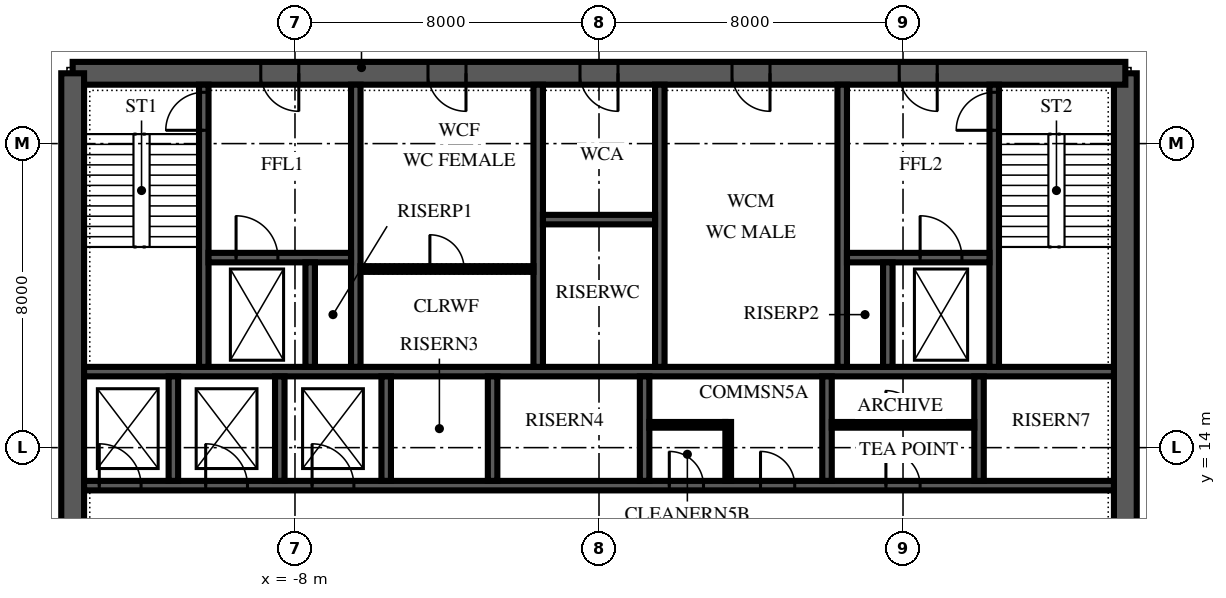
"""IFC4 building model, lengths in metres.
Left out: names, types, materials, properties, quantities, classifications, styles, units other than length and angle.
Written with IfcOpenShell. Run it as: python <this file> out.ifc"""

import sys

from ifc_helpers import new_model, si_unit, direction, frame, frame_2d, origin, place, context, subcontext, project, spatial, polyline, rectangle, outline, extrude, element, fill, save


model = new_model("IFC4")
c1 = context("Model", 3, precision=1e-05, world=origin(), true_north=direction((0.0, 1.0)))
c2 = subcontext(c1, "Body", "Model", "MODEL_VIEW")
j1 = project(units=[si_unit("LENGTHUNIT", "METRE"), si_unit("PLANEANGLEUNIT", "RADIAN")], contexts=[c1])
p1 = place(None, origin())
s1 = spatial("IfcSite", under=j1, at=p1, CompositionType="ELEMENT")
p2 = place(p1, origin())
s2 = spatial("IfcBuilding", under=s1, at=p2, CompositionType="ELEMENT")
p3 = place(p2, frame((0.0, 0.0, 190.0)))
s3 = spatial("IfcBuildingStorey", under=s2, at=p3, CompositionType="ELEMENT", Elevation=190.0)
p4 = place(p3, frame((13.85, 6.15, 0.0), z_axis=(0.0, 0.0, 1.0), x_axis=(0.0, 1.0, 0.0)))
e1 = element("IfcWall", 1, at=p4, inside=s3, PredefinedType="SHEAR", context=c2, shape_type="SweptSolid", body=[
    extrude(outline(polyline([(0.0, -0.3), (17.7, -0.3), (17.7, 0.0), (17.4, 0.0), (17.4, 0.3), (0.3, 0.3), (0.3, 0.0), (0.0, 0.0), (0.0, -0.3)])), origin(), (0.0, 0.0, 1.0), 4.0),
])
p5 = place(p4, frame((4.15, 0.0, 0.0)))
e2 = element("IfcOpeningElement", 2, at=p5, cuts=e1, PredefinedType="OPENING", context=c2, shape_type="SweptSolid", body=[
    extrude(rectangle(XDim=1.8, YDim=2.4, at=frame_2d((0.9, 1.2))), frame((0.0, 0.315, 0.0), z_axis=(0.0, -1.0, 0.0), x_axis=(1.0, 0.0, 0.0)), (0.0, 0.0, 1.0), 0.63),
])
p6 = place(p3, frame((13.85, 23.85, 0.0), z_axis=(0.0, 0.0, 1.0), x_axis=(-1.0, 0.0, 0.0)))
e3 = element("IfcWall", 3, at=p6, inside=s3, PredefinedType="SHEAR", context=c2, shape_type="SweptSolid", body=[
    extrude(rectangle(XDim=27.7, YDim=0.6, at=frame_2d((13.85, 0.0))), origin(), (0.0, 0.0, 1.0), 4.0),
])
p7 = place(p6, frame((21.75, 0.0, 0.0)))
e4 = element("IfcOpeningElement", 4, at=p7, cuts=e3, PredefinedType="OPENING", context=c2, shape_type="SweptSolid", body=[
    extrude(rectangle(XDim=1.0, YDim=2.1, at=frame_2d((0.5, 1.05))), frame((0.0, 0.315, 0.0), z_axis=(0.0, -1.0, 0.0), x_axis=(1.0, 0.0, 0.0)), (0.0, 0.0, 1.0), 0.63),
])
p8 = place(p6, frame((4.95, 0.0, 0.0)))
e5 = element("IfcOpeningElement", 5, at=p8, cuts=e3, PredefinedType="OPENING", context=c2, shape_type="SweptSolid", body=[
    extrude(rectangle(XDim=1.0, YDim=2.1, at=frame_2d((0.5, 1.05))), frame((0.0, 0.315, 0.0), z_axis=(0.0, -1.0, 0.0), x_axis=(1.0, 0.0, 0.0)), (0.0, 0.0, 1.0), 0.63),
])
p9 = place(p6, frame((17.35, 0.0, 0.0)))
e6 = element("IfcOpeningElement", 6, at=p9, cuts=e3, PredefinedType="OPENING", context=c2, shape_type="SweptSolid", body=[
    extrude(rectangle(XDim=1.0, YDim=2.1, at=frame_2d((0.5, 1.05))), frame((0.0, 0.315, 0.0), z_axis=(0.0, -1.0, 0.0), x_axis=(1.0, 0.0, 0.0)), (0.0, 0.0, 1.0), 0.63),
])
p10 = place(p6, frame((13.35, 0.0, 0.0)))
e7 = element("IfcOpeningElement", 7, at=p10, cuts=e3, PredefinedType="OPENING", context=c2, shape_type="SweptSolid", body=[
    extrude(rectangle(XDim=1.0, YDim=2.1, at=frame_2d((0.5, 1.05))), frame((0.0, 0.315, 0.0), z_axis=(0.0, -1.0, 0.0), x_axis=(1.0, 0.0, 0.0)), (0.0, 0.0, 1.0), 0.63),
])
p11 = place(p6, frame((9.35, 0.0, 0.0)))
e8 = element("IfcOpeningElement", 8, at=p11, cuts=e3, PredefinedType="OPENING", context=c2, shape_type="SweptSolid", body=[
    extrude(rectangle(XDim=1.0, YDim=2.1, at=frame_2d((0.5, 1.05))), frame((0.0, 0.315, 0.0), z_axis=(0.0, -1.0, 0.0), x_axis=(1.0, 0.0, 0.0)), (0.0, 0.0, 1.0), 0.63),
])
p12 = place(p3, frame((-13.85, 23.85, 0.0), z_axis=(0.0, 0.0, 1.0), x_axis=(0.0, -1.0, 0.0)))
e9 = element("IfcWall", 9, at=p12, inside=s3, PredefinedType="SHEAR", context=c2, shape_type="SweptSolid", body=[
    extrude(outline(polyline([(0.0, -0.3), (17.7, -0.3), (17.7, 0.0), (17.4, 0.0), (17.4, 0.3), (0.3, 0.3), (0.3, 0.0), (0.0, 0.0), (0.0, -0.3)])), origin(), (0.0, 0.0, 1.0), 4.0),
])
p13 = place(p12, frame((11.75, 0.0, 0.0)))
e10 = element("IfcOpeningElement", 10, at=p13, cuts=e9, PredefinedType="OPENING", context=c2, shape_type="SweptSolid", body=[
    extrude(rectangle(XDim=1.8, YDim=2.4, at=frame_2d((0.9, 1.2))), frame((0.0, 0.315, 0.0), z_axis=(0.0, -1.0, 0.0), x_axis=(1.0, 0.0, 0.0)), (0.0, 0.0, 1.0), 0.63),
])
p14 = place(p3, frame((-13.55, 13.0, 0.0), z_axis=(0.0, 0.0, 1.0), x_axis=(1.0, 0.0, 0.0)))
e11 = element("IfcWall", 11, at=p14, inside=s3, PredefinedType="SHEAR", context=c2, shape_type="SweptSolid", body=[
    extrude(rectangle(XDim=27.1, YDim=0.25, at=frame_2d((13.55, 0.0))), origin(), (0.0, 0.0, 1.0), 4.0),
])
p15 = place(p14, frame((0.4, 0.0, 0.0)))
e12 = element("IfcOpeningElement", 12, at=p15, cuts=e11, PredefinedType="OPENING", context=c2, shape_type="SweptSolid", body=[
    extrude(rectangle(XDim=1.1, YDim=2.1, at=frame_2d((0.55, 1.05))), frame((0.0, 0.14, 0.0), z_axis=(0.0, -1.0, 0.0), x_axis=(1.0, 0.0, 0.0)), (0.0, 0.0, 1.0), 0.28),
])
p16 = place(p14, frame((3.2, 0.0, 0.0)))
e13 = element("IfcOpeningElement", 13, at=p16, cuts=e11, PredefinedType="OPENING", context=c2, shape_type="SweptSolid", body=[
    extrude(rectangle(XDim=1.1, YDim=2.1, at=frame_2d((0.55, 1.05))), frame((0.0, 0.14, 0.0), z_axis=(0.0, -1.0, 0.0), x_axis=(1.0, 0.0, 0.0)), (0.0, 0.0, 1.0), 0.28),
])
p17 = place(p14, frame((6.0, 0.0, 0.0)))
e14 = element("IfcOpeningElement", 14, at=p17, cuts=e11, PredefinedType="OPENING", context=c2, shape_type="SweptSolid", body=[
    extrude(rectangle(XDim=1.1, YDim=2.1, at=frame_2d((0.55, 1.05))), frame((0.0, 0.14, 0.0), z_axis=(0.0, -1.0, 0.0), x_axis=(1.0, 0.0, 0.0)), (0.0, 0.0, 1.0), 0.28),
])
p18 = place(p14, frame((17.8, 0.0, 0.0)))
e15 = element("IfcOpeningElement", 15, at=p18, cuts=e11, PredefinedType="OPENING", context=c2, shape_type="SweptSolid", body=[
    extrude(rectangle(XDim=0.9, YDim=2.1, at=frame_2d((0.45, 1.05))), frame((0.0, 0.14, 0.0), z_axis=(0.0, -1.0, 0.0), x_axis=(1.0, 0.0, 0.0)), (0.0, 0.0, 1.0), 0.28),
])
p19 = place(p14, frame((15.4, 0.0, 0.0)))
e16 = element("IfcOpeningElement", 16, at=p19, cuts=e11, PredefinedType="OPENING", context=c2, shape_type="SweptSolid", body=[
    extrude(rectangle(XDim=0.9, YDim=2.1, at=frame_2d((0.45, 1.05))), frame((0.0, 0.14, 0.0), z_axis=(0.0, -1.0, 0.0), x_axis=(1.0, 0.0, 0.0)), (0.0, 0.0, 1.0), 0.28),
])
p20 = place(p14, frame((21.1, 0.0, 0.0)))
e17 = element("IfcOpeningElement", 17, at=p20, cuts=e11, PredefinedType="OPENING", context=c2, shape_type="SweptSolid", body=[
    extrude(rectangle(XDim=0.9, YDim=2.1, at=frame_2d((0.45, 1.05))), frame((0.0, 0.14, 0.0), z_axis=(0.0, -1.0, 0.0), x_axis=(1.0, 0.0, 0.0)), (0.0, 0.0, 1.0), 0.28),
])
p21 = place(p3, frame((-13.55, 16.0, 0.0), z_axis=(0.0, 0.0, 1.0), x_axis=(1.0, 0.0, 0.0)))
e18 = element("IfcWall", 18, at=p21, inside=s3, PredefinedType="SHEAR", context=c2, shape_type="SweptSolid", body=[
    extrude(rectangle(XDim=27.1, YDim=0.25, at=frame_2d((13.55, 0.0))), origin(), (0.0, 0.0, 1.0), 4.0),
])
for number, where, z_axis, x_axis in (
    (19, (-11.2, 13.125, 0.0), (0.0, 0.0, 1.0), (0.0, 1.0, 0.0)),
    (20, (-8.4, 13.125, 0.0), (0.0, 0.0, 1.0), (0.0, 1.0, 0.0)),
    (21, (-5.6, 13.125, 0.0), (0.0, 0.0, 1.0), (0.0, 1.0, 0.0)),
    (22, (-2.8, 13.125, 0.0), (0.0, 0.0, 1.0), (0.0, 1.0, 0.0)),
    (23, (1.2, 13.125, 0.0), (0.0, 0.0, 1.0), (0.0, 1.0, 0.0)),
    (24, (6.0, 13.125, 0.0), (0.0, 0.0, 1.0), (0.0, 1.0, 0.0)),
    (25, (10.0, 13.125, 0.0), (0.0, 0.0, 1.0), (0.0, 1.0, 0.0)),
):
    element("IfcWall", number, at=place(p3, frame(where, z_axis=z_axis, x_axis=x_axis)), inside=s3, PredefinedType="SHEAR", context=c2, shape_type="SweptSolid", body=[
        extrude(rectangle(XDim=2.75, YDim=0.25, at=frame_2d((1.375, 0.0))), origin(), (0.0, 0.0, 1.0), 4.0),
    ])
p22 = place(p3, frame((-10.4, 16.125, 0.0), z_axis=(0.0, 0.0, 1.0), x_axis=(0.0, 1.0, 0.0)))
e26 = element("IfcWall", 26, at=p22, inside=s3, PredefinedType="SHEAR", context=c2, shape_type="SweptSolid", body=[
    extrude(rectangle(XDim=7.425, YDim=0.25, at=frame_2d((3.712, 0.0))), origin(), (0.0, 0.0, 1.0), 4.0),
])
p23 = place(p22, frame((6.225, 0.0, 0.0)))
e27 = element("IfcOpeningElement", 27, at=p23, cuts=e26, PredefinedType="OPENING", context=c2, shape_type="SweptSolid", body=[
    extrude(rectangle(XDim=1.0, YDim=2.1, at=frame_2d((0.5, 1.05))), frame((0.0, 0.14, 0.0), z_axis=(0.0, -1.0, 0.0), x_axis=(1.0, 0.0, 0.0)), (0.0, 0.0, 1.0), 0.28),
])
for number, where, z_axis, x_axis in (
    (28, (-6.4, 16.125, 0.0), (0.0, 0.0, 1.0), (0.0, 1.0, 0.0)),
    (29, (-1.6, 16.125, 0.0), (0.0, 0.0, 1.0), (0.0, 1.0, 0.0)),
    (30, (1.6, 16.125, 0.0), (0.0, 0.0, 1.0), (0.0, 1.0, 0.0)),
    (31, (6.4, 16.125, 0.0), (0.0, 0.0, 1.0), (0.0, 1.0, 0.0)),
):
    element("IfcWall", number, at=place(p3, frame(where, z_axis=z_axis, x_axis=x_axis)), inside=s3, PredefinedType="SHEAR", context=c2, shape_type="SweptSolid", body=[
        extrude(rectangle(XDim=7.425, YDim=0.25, at=frame_2d((3.712, 0.0))), origin(), (0.0, 0.0, 1.0), 4.0),
    ])
p24 = place(p3, frame((10.4, 16.125, 0.0), z_axis=(0.0, 0.0, 1.0), x_axis=(0.0, 1.0, 0.0)))
e32 = element("IfcWall", 32, at=p24, inside=s3, PredefinedType="SHEAR", context=c2, shape_type="SweptSolid", body=[
    extrude(rectangle(XDim=7.425, YDim=0.25, at=frame_2d((3.712, 0.0))), origin(), (0.0, 0.0, 1.0), 4.0),
])
p25 = place(p24, frame((6.225, 0.0, 0.0)))
e33 = element("IfcOpeningElement", 33, at=p25, cuts=e32, PredefinedType="OPENING", context=c2, shape_type="SweptSolid", body=[
    extrude(rectangle(XDim=1.0, YDim=2.1, at=frame_2d((0.5, 1.05))), frame((0.0, 0.14, 0.0), z_axis=(0.0, -1.0, 0.0), x_axis=(1.0, 0.0, 0.0)), (0.0, 0.0, 1.0), 0.28),
])
p26 = place(p3, frame((-10.275, 19.0, 0.0), z_axis=(0.0, 0.0, 1.0), x_axis=(1.0, 0.0, 0.0)))
e34 = element("IfcWall", 34, at=p26, inside=s3, PredefinedType="SHEAR", context=c2, shape_type="SweptSolid", body=[
    extrude(rectangle(XDim=3.75, YDim=0.25, at=frame_2d((1.875, 0.0))), origin(), (0.0, 0.0, 1.0), 4.0),
])
p27 = place(p26, frame((0.725, 0.0, 0.0)))
e35 = element("IfcOpeningElement", 35, at=p27, cuts=e34, PredefinedType="OPENING", context=c2, shape_type="SweptSolid", body=[
    extrude(rectangle(XDim=1.1, YDim=2.1, at=frame_2d((0.55, 1.05))), frame((0.0, 0.14, 0.0), z_axis=(0.0, -1.0, 0.0), x_axis=(1.0, 0.0, 0.0)), (0.0, 0.0, 1.0), 0.28),
])
p28 = place(p3, frame((6.525, 19.0, 0.0), z_axis=(0.0, 0.0, 1.0), x_axis=(1.0, 0.0, 0.0)))
e36 = element("IfcWall", 36, at=p28, inside=s3, PredefinedType="SHEAR", context=c2, shape_type="SweptSolid", body=[
    extrude(rectangle(XDim=3.75, YDim=0.25, at=frame_2d((1.875, 0.0))), origin(), (0.0, 0.0, 1.0), 4.0),
])
p29 = place(p28, frame((1.925, 0.0, 0.0)))
e37 = element("IfcOpeningElement", 37, at=p29, cuts=e36, PredefinedType="OPENING", context=c2, shape_type="SweptSolid", body=[
    extrude(rectangle(XDim=1.1, YDim=2.1, at=frame_2d((0.55, 1.05))), frame((0.0, 0.14, 0.0), z_axis=(0.0, -1.0, 0.0), x_axis=(1.0, 0.0, 0.0)), (0.0, 0.0, 1.0), 0.28),
])
for number, where, z_axis, x_axis in (
    (38, (-7.6, 16.125, 0.0), (0.0, 0.0, 1.0), (0.0, 1.0, 0.0)),
    (39, (7.6, 16.125, 0.0), (0.0, 0.0, 1.0), (0.0, 1.0, 0.0)),
):
    element("IfcWall", number, at=place(p3, frame(where, z_axis=z_axis, x_axis=x_axis)), inside=s3, PredefinedType="SHEAR", context=c2, shape_type="SweptSolid", body=[
        extrude(rectangle(XDim=2.75, YDim=0.25, at=frame_2d((1.375, 0.0))), origin(), (0.0, 0.0, 1.0), 4.0),
    ])
p30 = place(p3, frame((-1.475, 20.0, 0.0), z_axis=(0.0, 0.0, 1.0), x_axis=(1.0, 0.0, 0.0)))
e40 = element("IfcWall", 40, at=p30, inside=s3, PredefinedType="SHEAR", context=c2, shape_type="SweptSolid", body=[
    extrude(rectangle(XDim=2.95, YDim=0.25, at=frame_2d((1.475, 0.0))), origin(), (0.0, 0.0, 1.0), 4.0),
])
p31 = place(p3, frame((-6.275, 18.7, 0.0), z_axis=(0.0, 0.0, 1.0), x_axis=(1.0, 0.0, 0.0)))
e41 = element("IfcWall", 41, at=p31, inside=s3, PredefinedType="PARTITIONING", context=c2, shape_type="SweptSolid", body=[
    extrude(rectangle(XDim=4.55, YDim=0.15, at=frame_2d((2.275, 0.0))), origin(), (0.0, 0.0, 1.0), 3.85),
])
p32 = place(p31, frame((1.825, 0.0, 0.0)))
e42 = element("IfcOpeningElement", 42, at=p32, cuts=e41, PredefinedType="OPENING", context=c2, shape_type="SweptSolid", body=[
    extrude(rectangle(XDim=0.9, YDim=2.1, at=frame_2d((0.45, 1.05))), frame((0.0, 0.09, 0.0), z_axis=(0.0, -1.0, 0.0), x_axis=(1.0, 0.0, 0.0)), (0.0, 0.0, 1.0), 0.18),
])
p33 = place(p3, frame((3.4, 13.125, 0.0), z_axis=(0.0, 0.0, 1.0), x_axis=(0.0, 1.0, 0.0)))
e43 = element("IfcWall", 43, at=p33, inside=s3, PredefinedType="PARTITIONING", context=c2, shape_type="SweptSolid", body=[
    extrude(rectangle(XDim=1.55, YDim=0.15, at=frame_2d((0.775, 0.0))), origin(), (0.0, 0.0, 1.0), 3.85),
])
p34 = place(p3, frame((1.325, 14.6, 0.0), z_axis=(0.0, 0.0, 1.0), x_axis=(1.0, 0.0, 0.0)))
e44 = element("IfcWall", 44, at=p34, inside=s3, PredefinedType="PARTITIONING", context=c2, shape_type="SweptSolid", body=[
    extrude(rectangle(XDim=2.0, YDim=0.15, at=frame_2d((1.0, 0.0))), origin(), (0.0, 0.0, 1.0), 3.85),
])
p35 = place(p3, frame((6.125, 14.6, 0.0), z_axis=(0.0, 0.0, 1.0), x_axis=(1.0, 0.0, 0.0)))
e45 = element("IfcWall", 45, at=p35, inside=s3, PredefinedType="PARTITIONING", context=c2, shape_type="SweptSolid", body=[
    extrude(rectangle(XDim=3.75, YDim=0.15, at=frame_2d((1.875, 0.0))), origin(), (0.0, 0.0, 1.0), 3.85),
])
p36 = place(p35, frame((1.425, 0.0, 0.0)))
e46 = element("IfcOpeningElement", 46, at=p36, cuts=e45, PredefinedType="OPENING", context=c2, shape_type="SweptSolid", body=[
    extrude(rectangle(XDim=0.9, YDim=2.1, at=frame_2d((0.45, 1.05))), frame((0.0, 0.09, 0.0), z_axis=(0.0, -1.0, 0.0), x_axis=(1.0, 0.0, 0.0)), (0.0, 0.0, 1.0), 0.18),
])
p37 = place(p7, origin())
e47 = element("IfcDoor", 47, at=p37, inside=s3, OperationType="SINGLE_SWING_RIGHT", PredefinedType="DOOR", context=c2, shape_type="SweptSolid", body=[
    extrude(rectangle(XDim=1.0, YDim=2.1, at=frame_2d((0.5, 1.05))), frame((0.0, 0.3, 0.0), z_axis=(0.0, -1.0, 0.0), x_axis=(1.0, 0.0, 0.0)), (0.0, 0.0, 1.0), 0.6),
])
fill(e4, e47)
p38 = place(p8, origin())
e48 = element("IfcDoor", 48, at=p38, inside=s3, OperationType="SINGLE_SWING_RIGHT", PredefinedType="DOOR", context=c2, shape_type="SweptSolid", body=[
    extrude(rectangle(XDim=1.0, YDim=2.1, at=frame_2d((0.5, 1.05))), frame((0.0, 0.3, 0.0), z_axis=(0.0, -1.0, 0.0), x_axis=(1.0, 0.0, 0.0)), (0.0, 0.0, 1.0), 0.6),
])
fill(e5, e48)
p39 = place(p9, origin())
e49 = element("IfcDoor", 49, at=p39, inside=s3, OperationType="SINGLE_SWING_LEFT", PredefinedType="DOOR", context=c2, shape_type="SweptSolid", body=[
    extrude(rectangle(XDim=1.0, YDim=2.1, at=frame_2d((0.5, 1.05))), frame((0.0, 0.3, 0.0), z_axis=(0.0, -1.0, 0.0), x_axis=(1.0, 0.0, 0.0)), (0.0, 0.0, 1.0), 0.6),
])
fill(e6, e49)
p40 = place(p10, origin())
e50 = element("IfcDoor", 50, at=p40, inside=s3, OperationType="SINGLE_SWING_LEFT", PredefinedType="DOOR", context=c2, shape_type="SweptSolid", body=[
    extrude(rectangle(XDim=1.0, YDim=2.1, at=frame_2d((0.5, 1.05))), frame((0.0, 0.3, 0.0), z_axis=(0.0, -1.0, 0.0), x_axis=(1.0, 0.0, 0.0)), (0.0, 0.0, 1.0), 0.6),
])
fill(e7, e50)
p41 = place(p11, origin())
e51 = element("IfcDoor", 51, at=p41, inside=s3, OperationType="SINGLE_SWING_LEFT", PredefinedType="DOOR", context=c2, shape_type="SweptSolid", body=[
    extrude(rectangle(XDim=1.0, YDim=2.1, at=frame_2d((0.5, 1.05))), frame((0.0, 0.3, 0.0), z_axis=(0.0, -1.0, 0.0), x_axis=(1.0, 0.0, 0.0)), (0.0, 0.0, 1.0), 0.6),
])
fill(e8, e51)
p42 = place(p23, origin())
e52 = element("IfcDoor", 52, at=p42, inside=s3, OperationType="SINGLE_SWING_LEFT", PredefinedType="DOOR", context=c2, shape_type="SweptSolid", body=[
    extrude(rectangle(XDim=1.0, YDim=2.1, at=frame_2d((0.5, 1.05))), frame((0.0, 0.125, 0.0), z_axis=(0.0, -1.0, 0.0), x_axis=(1.0, 0.0, 0.0)), (0.0, 0.0, 1.0), 0.25),
])
fill(e27, e52)
p43 = place(p25, origin())
e53 = element("IfcDoor", 53, at=p43, inside=s3, OperationType="SINGLE_SWING_LEFT", PredefinedType="DOOR", context=c2, shape_type="SweptSolid", body=[
    extrude(rectangle(XDim=1.0, YDim=2.1, at=frame_2d((0.5, 1.05))), frame((0.0, 0.125, 0.0), z_axis=(0.0, -1.0, 0.0), x_axis=(1.0, 0.0, 0.0)), (0.0, 0.0, 1.0), 0.25),
])
fill(e33, e53)
p44 = place(p15, origin())
e54 = element("IfcDoor", 54, at=p44, inside=s3, OperationType="SLIDING_TO_LEFT", PredefinedType="DOOR", context=c2, shape_type="SweptSolid", body=[
    extrude(rectangle(XDim=1.1, YDim=2.1, at=frame_2d((0.55, 1.05))), frame((0.0, 0.125, 0.0), z_axis=(0.0, -1.0, 0.0), x_axis=(1.0, 0.0, 0.0)), (0.0, 0.0, 1.0), 0.25),
])
fill(e12, e54)
p45 = place(p16, origin())
e55 = element("IfcDoor", 55, at=p45, inside=s3, OperationType="SLIDING_TO_LEFT", PredefinedType="DOOR", context=c2, shape_type="SweptSolid", body=[
    extrude(rectangle(XDim=1.1, YDim=2.1, at=frame_2d((0.55, 1.05))), frame((0.0, 0.125, 0.0), z_axis=(0.0, -1.0, 0.0), x_axis=(1.0, 0.0, 0.0)), (0.0, 0.0, 1.0), 0.25),
])
fill(e13, e55)
p46 = place(p17, origin())
e56 = element("IfcDoor", 56, at=p46, inside=s3, OperationType="SLIDING_TO_LEFT", PredefinedType="DOOR", context=c2, shape_type="SweptSolid", body=[
    extrude(rectangle(XDim=1.1, YDim=2.1, at=frame_2d((0.55, 1.05))), frame((0.0, 0.125, 0.0), z_axis=(0.0, -1.0, 0.0), x_axis=(1.0, 0.0, 0.0)), (0.0, 0.0, 1.0), 0.25),
])
fill(e14, e56)
p47 = place(p29, origin())
e57 = element("IfcDoor", 57, at=p47, inside=s3, OperationType="SLIDING_TO_RIGHT", PredefinedType="DOOR", context=c2, shape_type="SweptSolid", body=[
    extrude(rectangle(XDim=1.1, YDim=2.1, at=frame_2d((0.55, 1.05))), frame((0.0, 0.125, 0.0), z_axis=(0.0, -1.0, 0.0), x_axis=(1.0, 0.0, 0.0)), (0.0, 0.0, 1.0), 0.25),
])
fill(e37, e57)
p48 = place(p27, origin())
e58 = element("IfcDoor", 58, at=p48, inside=s3, OperationType="SLIDING_TO_RIGHT", PredefinedType="DOOR", context=c2, shape_type="SweptSolid", body=[
    extrude(rectangle(XDim=1.1, YDim=2.1, at=frame_2d((0.55, 1.05))), frame((0.0, 0.125, 0.0), z_axis=(0.0, -1.0, 0.0), x_axis=(1.0, 0.0, 0.0)), (0.0, 0.0, 1.0), 0.25),
])
fill(e35, e58)
p49 = place(p18, origin())
e59 = element("IfcDoor", 59, at=p49, inside=s3, OperationType="SINGLE_SWING_LEFT", PredefinedType="DOOR", context=c2, shape_type="SweptSolid", body=[
    extrude(rectangle(XDim=0.9, YDim=2.1, at=frame_2d((0.45, 1.05))), frame((0.0, 0.125, 0.0), z_axis=(0.0, -1.0, 0.0), x_axis=(1.0, 0.0, 0.0)), (0.0, 0.0, 1.0), 0.25),
])
fill(e15, e59)
p50 = place(p19, origin())
e60 = element("IfcDoor", 60, at=p50, inside=s3, OperationType="SINGLE_SWING_LEFT", PredefinedType="DOOR", context=c2, shape_type="SweptSolid", body=[
    extrude(rectangle(XDim=0.9, YDim=2.1, at=frame_2d((0.45, 1.05))), frame((0.0, 0.125, 0.0), z_axis=(0.0, -1.0, 0.0), x_axis=(1.0, 0.0, 0.0)), (0.0, 0.0, 1.0), 0.25),
])
fill(e16, e60)
p51 = place(p20, origin())
e61 = element("IfcDoor", 61, at=p51, inside=s3, OperationType="SINGLE_SWING_LEFT", PredefinedType="DOOR", context=c2, shape_type="SweptSolid", body=[
    extrude(rectangle(XDim=0.9, YDim=2.1, at=frame_2d((0.45, 1.05))), frame((0.0, 0.125, 0.0), z_axis=(0.0, -1.0, 0.0), x_axis=(1.0, 0.0, 0.0)), (0.0, 0.0, 1.0), 0.25),
])
fill(e17, e61)
p52 = place(p36, origin())
e62 = element("IfcDoor", 62, at=p52, inside=s3, OperationType="SINGLE_SWING_LEFT", PredefinedType="DOOR", context=c2, shape_type="SweptSolid", body=[
    extrude(rectangle(XDim=0.9, YDim=2.1, at=frame_2d((0.45, 1.05))), frame((0.0, 0.075, 0.0), z_axis=(0.0, -1.0, 0.0), x_axis=(1.0, 0.0, 0.0)), (0.0, 0.0, 1.0), 0.149),
])
fill(e46, e62)
p53 = place(p32, origin())
e63 = element("IfcDoor", 63, at=p53, inside=s3, OperationType="SINGLE_SWING_LEFT", PredefinedType="DOOR", context=c2, shape_type="SweptSolid", body=[
    extrude(rectangle(XDim=0.9, YDim=2.1, at=frame_2d((0.45, 1.05))), frame((0.0, 0.075, 0.0), z_axis=(0.0, -1.0, 0.0), x_axis=(1.0, 0.0, 0.0)), (0.0, 0.0, 1.0), 0.149),
])
fill(e42, e63)
save(model, sys.argv[1])
